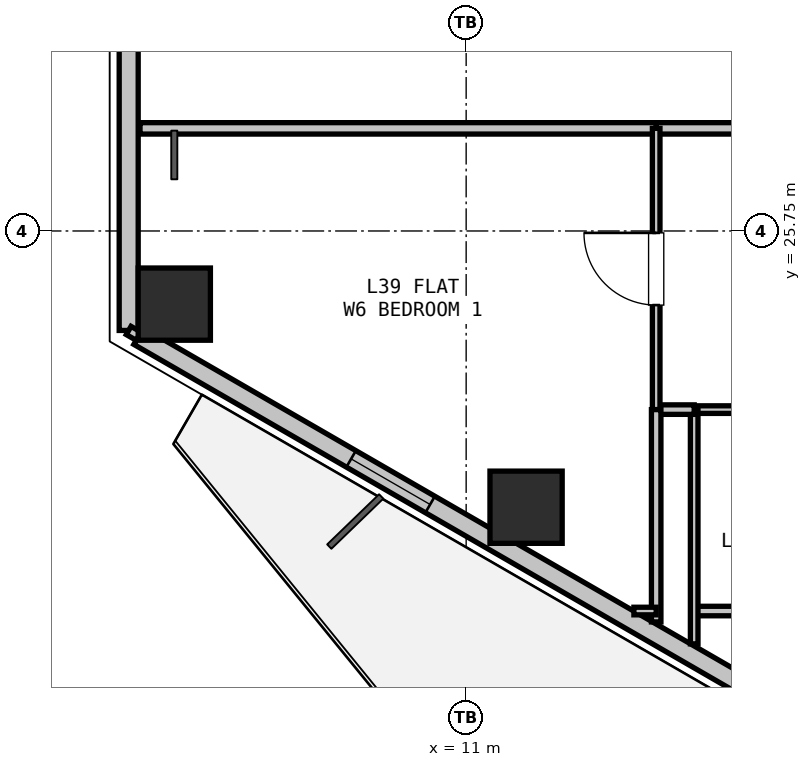
"""IFC4 building model, lengths in metres.
Left out: names, types, materials, properties, quantities, classifications, styles, units other than length and angle.
Written with IfcOpenShell. Run it as: python <this file> out.ifc"""

import sys

from ifc_helpers import new_model, si_unit, direction, frame, frame_2d, origin, origin_2d, place, context, subcontext, project, spatial, rectangle, hollow_rectangle, extrude, element, fill, save


model = new_model("IFC4")
c1 = context("Model", 3, precision=1e-05, world=origin(), true_north=direction((0.0, 1.0)))
c2 = subcontext(c1, "Body", "Model", "MODEL_VIEW")
j1 = project(units=[si_unit("LENGTHUNIT", "METRE"), si_unit("PLANEANGLEUNIT", "RADIAN")], contexts=[c1])
p1 = place(None, origin())
s1 = spatial("IfcSite", under=j1, at=p1, CompositionType="ELEMENT")
p2 = place(p1, origin())
s2 = spatial("IfcBuilding", under=s1, at=p2, CompositionType="ELEMENT")
p3 = place(p2, frame((0.0, 0.0, 141.0)))
s3 = spatial("IfcBuildingStorey", under=s2, at=p3, CompositionType="ELEMENT", Elevation=141.0)
for number, where, z_axis, x_axis in (
    (1, (11.788, 22.116, 0.0), (0.0, 0.0, 1.0), (1.0, 0.0, 0.0)),
    (2, (7.16, 24.788, 0.0), (0.0, 0.0, 1.0), (1.0, 0.0, 0.0)),
):
    element("IfcColumn", number, at=place(p3, frame(where, z_axis=z_axis, x_axis=x_axis)), inside=s3, PredefinedType="COLUMN", context=c2, shape_type="SweptSolid", body=[
        extrude(hollow_rectangle(XDim=0.95, YDim=0.95, WallThickness=0.028, at=origin_2d()), origin(), (0.0, 0.0, 1.0), 3.3),
    ])
p4 = place(p3, frame((6.56, 24.441, 0.0), z_axis=(0.0, 0.0, 1.0), x_axis=(0.0, 1.0, 0.0)))
e3 = element("IfcWall", 3, at=p4, inside=s3, PredefinedType="SOLIDWALL", context=c2, shape_type="SweptSolid", body=[
    extrude(rectangle(XDim=4.617, YDim=0.25, at=frame_2d((2.309, 0.0))), origin(), (0.0, 0.0, 1.0), 2.68),
])
p5 = place(p3, frame((16.378, 18.773, 0.0), z_axis=(0.0, 0.0, 1.0), x_axis=(-0.866027848477, 0.499995765644, 0.0)))
e4 = element("IfcWall", 4, at=p5, inside=s3, PredefinedType="SOLIDWALL", context=c2, shape_type="SweptSolid", body=[
    extrude(rectangle(XDim=11.186, YDim=0.25, at=frame_2d((5.593, 0.0))), origin(), (0.0, 0.0, 1.0), 2.68),
])
p6 = place(p5, frame((6.757, 0.0, 0.9)))
e5 = element("IfcOpeningElement", 5, at=p6, cuts=e4, PredefinedType="OPENING", context=c2, shape_type="SweptSolid", body=[
    extrude(rectangle(XDim=1.2, YDim=1.4, at=frame_2d((0.6, 0.7))), frame((0.0, 0.135, 0.0), z_axis=(0.0, -1.0, 0.0), x_axis=(1.0, 0.0, 0.0)), (0.0, 0.0, 1.0), 0.27),
])
p7 = place(p3, frame((14.0, 23.4, 0.0), z_axis=(0.0, 0.0, 1.0), x_axis=(1.0, 0.0, 0.0)))
e6 = element("IfcWall", 6, at=p7, inside=s3, PredefinedType="PARTITIONING", context=c2, shape_type="SweptSolid", body=[
    extrude(rectangle(XDim=3.0, YDim=0.1, at=frame_2d((1.5, 0.0))), origin(), (0.0, 0.0, 1.0), 3.06),
])
p8 = place(p7, frame((1.025, 0.0, 0.0)))
e7 = element("IfcOpeningElement", 7, at=p8, cuts=e6, PredefinedType="OPENING", context=c2, shape_type="SweptSolid", body=[
    extrude(rectangle(XDim=0.95, YDim=2.1, at=frame_2d((0.475, 1.05))), frame((0.0, 0.06, 0.0), z_axis=(0.0, -1.0, 0.0), x_axis=(1.0, 0.0, 0.0)), (0.0, 0.0, 1.0), 0.12),
])
p9 = place(p3, frame((17.0, 20.75, 0.0), z_axis=(0.0, 0.0, 1.0), x_axis=(-1.0, 0.0, 0.0)))
e8 = element("IfcWall", 8, at=p9, inside=s3, PredefinedType="PARTITIONING", context=c2, shape_type="SweptSolid", body=[
    extrude(rectangle(XDim=3.0, YDim=0.125, at=frame_2d((1.5, 0.0))), origin(), (0.0, 0.0, 1.0), 2.365),
])
p10 = place(p3, frame((14.0, 20.318, 0.0), z_axis=(0.0, 0.0, 1.0), x_axis=(0.0, 1.0, 0.0)))
e9 = element("IfcWall", 9, at=p10, inside=s3, PredefinedType="PARTITIONING", context=c2, shape_type="SweptSolid", body=[
    extrude(rectangle(XDim=3.082, YDim=0.1, at=frame_2d((1.541, 0.0))), origin(), (0.0, 0.0, 1.0), 2.365),
])
p11 = place(p3, frame((21.95, 27.1, 0.0), z_axis=(0.0, 0.0, 1.0), x_axis=(-1.0, 0.0, 0.0)))
e10 = element("IfcWall", 10, at=p11, inside=s3, PredefinedType="PARTITIONING", context=c2, shape_type="SweptSolid", body=[
    extrude(rectangle(XDim=8.45, YDim=0.15, at=frame_2d((4.225, 0.0))), origin(), (0.0, 0.0, 1.0), 2.585),
])
p12 = place(p3, frame((13.5, 27.1, 0.0), z_axis=(0.0, 0.0, 1.0), x_axis=(-1.0, 0.0, 0.0)))
e11 = element("IfcWall", 11, at=p12, inside=s3, PredefinedType="PARTITIONING", context=c2, shape_type="SweptSolid", body=[
    extrude(rectangle(XDim=6.791, YDim=0.15, at=frame_2d((3.396, 0.0))), origin(), (0.0, 0.0, 1.0), 2.725),
])
p13 = place(p3, frame((14.0, 23.4, 0.0), z_axis=(0.0, 0.0, 1.0), x_axis=(-1.0, 0.0, 0.0)))
e12 = element("IfcWall", 12, at=p13, inside=s3, PredefinedType="PARTITIONING", context=c2, shape_type="SweptSolid", body=[
    extrude(rectangle(XDim=0.5, YDim=0.125, at=frame_2d((0.25, 0.0))), origin(), (0.0, 0.0, 1.0), 3.06),
])
p14 = place(p3, frame((13.5, 23.4, 0.0), z_axis=(0.0, 0.0, 1.0), x_axis=(0.0, 1.0, 0.0)))
e13 = element("IfcWall", 13, at=p14, inside=s3, PredefinedType="PARTITIONING", context=c2, shape_type="SweptSolid", body=[
    extrude(rectangle(XDim=3.7, YDim=0.1, at=frame_2d((1.85, 0.0))), origin(), (0.0, 0.0, 1.0), 3.06),
])
p15 = place(p14, frame((1.375, 0.0, 0.0)))
e14 = element("IfcOpeningElement", 14, at=p15, cuts=e13, PredefinedType="OPENING", context=c2, shape_type="SweptSolid", body=[
    extrude(rectangle(XDim=0.95, YDim=2.1, at=frame_2d((0.475, 1.05))), frame((0.0, 0.06, 0.0), z_axis=(0.0, -1.0, 0.0), x_axis=(1.0, 0.0, 0.0)), (0.0, 0.0, 1.0), 0.12),
])
p16 = place(p3, frame((13.5, 23.4, 0.0), z_axis=(0.0, 0.0, 1.0), x_axis=(0.0, -1.0, 0.0)))
e15 = element("IfcWall", 15, at=p16, inside=s3, PredefinedType="PARTITIONING", context=c2, shape_type="SweptSolid", body=[
    extrude(rectangle(XDim=2.793, YDim=0.125, at=frame_2d((1.396, 0.0))), origin(), (0.0, 0.0, 1.0), 2.365),
])
p17 = place(p3, frame((13.5, 20.75, 0.0), z_axis=(0.0, 0.0, 1.0), x_axis=(-1.0, 0.0, 0.0)))
e16 = element("IfcWall", 16, at=p17, inside=s3, PredefinedType="PARTITIONING", context=c2, shape_type="SweptSolid", body=[
    extrude(rectangle(XDim=0.293, YDim=0.1, at=frame_2d((0.146, 0.0))), origin(), (0.0, 0.0, 1.0), 3.06),
])
p18 = place(p3, frame((6.69, 24.366, 0.0), z_axis=(0.0, 0.0, 1.0), x_axis=(-0.866131372301, 0.499816412211, 0.0)))
e17 = element("IfcWall", 17, at=p18, inside=s3, PredefinedType="PARTITIONING", context=c2, shape_type="SweptSolid", body=[
    extrude(rectangle(XDim=0.15, YDim=0.125, at=frame_2d((0.075, 0.0))), origin(), (0.0, 0.0, 1.0), 3.06),
])
p19 = place(p6, origin())
e18 = element("IfcWindow", 18, at=p19, inside=s3, PartitioningType="SINGLE_PANEL", PredefinedType="WINDOW", context=c2, shape_type="SweptSolid", body=[
    extrude(rectangle(XDim=1.2, YDim=1.4, at=frame_2d((0.6, 0.7))), frame((0.0, 0.03, 0.0), z_axis=(0.0, -1.0, 0.0), x_axis=(1.0, 0.0, 0.0)), (0.0, 0.0, 1.0), 0.06),
])
fill(e5, e18)
p20 = place(p15, origin())
e19 = element("IfcDoor", 19, at=p20, inside=s3, OperationType="SINGLE_SWING_RIGHT", PredefinedType="DOOR", context=c2, shape_type="SweptSolid", body=[
    extrude(rectangle(XDim=0.95, YDim=2.1, at=frame_2d((0.475, 1.05))), frame((0.0, 0.025, 0.0), z_axis=(0.0, -1.0, 0.0), x_axis=(1.0, 0.0, 0.0)), (0.0, 0.0, 1.0), 0.05),
])
fill(e14, e19)
save(model, sys.argv[1])
